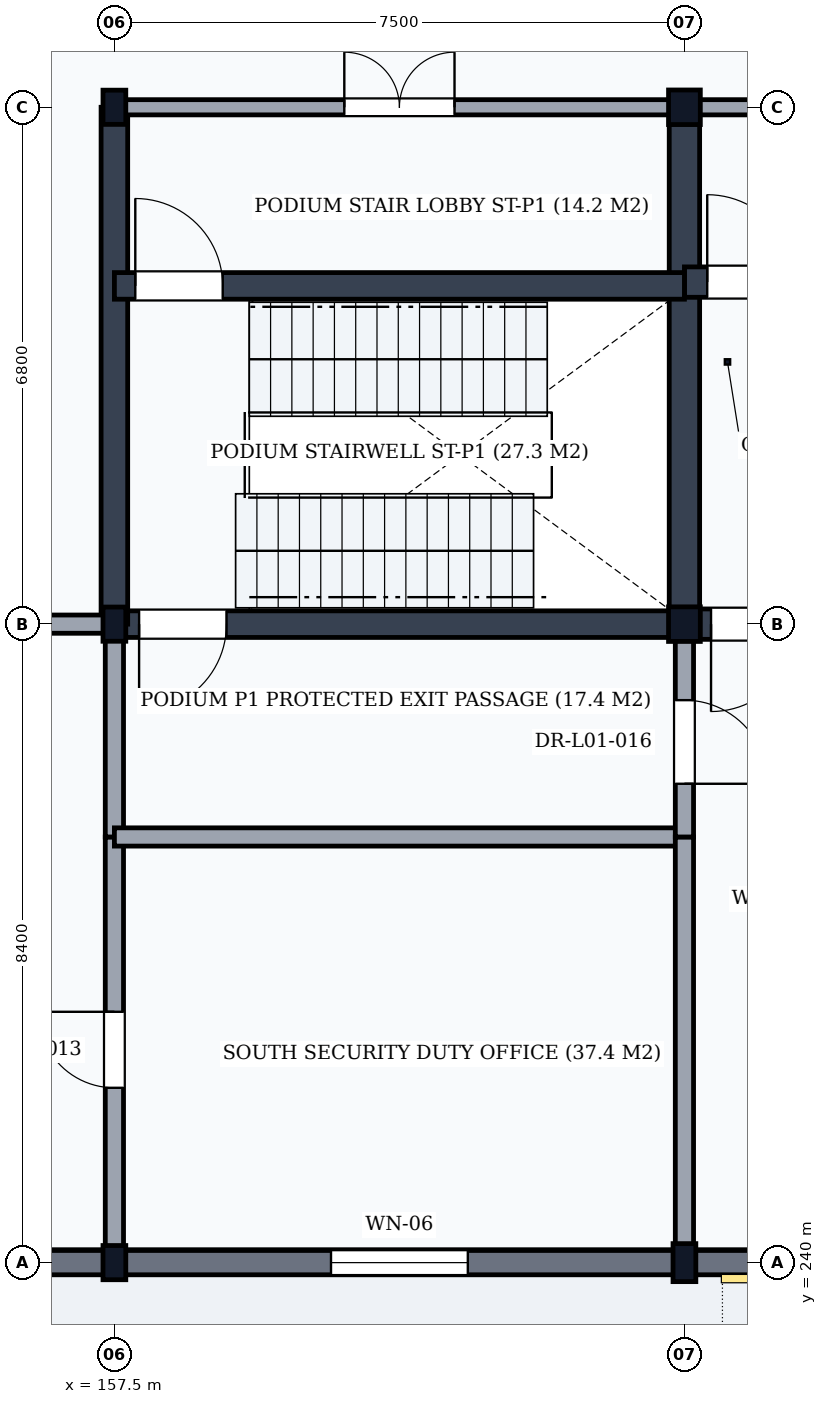
"""IFC4 building model, lengths in metres.
Left out: names, types, materials, properties, quantities, classifications, styles, units other than length and angle.
Written with IfcOpenShell. Run it as: python <this file> out.ifc"""

import sys

from ifc_helpers import new_model, si_unit, direction, frame, frame_2d, origin, origin_2d, place, context, subcontext, project, spatial, rectangle, i_section, extrude, element, fill, save


model = new_model("IFC4")
c1 = context("Model", 3, precision=1e-05, world=origin(), true_north=direction((0.0, 1.0)))
c2 = subcontext(c1, "Body", "Model", "MODEL_VIEW")
j1 = project(units=[si_unit("LENGTHUNIT", "METRE"), si_unit("PLANEANGLEUNIT", "RADIAN")], contexts=[c1])
p1 = place(None, origin())
s1 = spatial("IfcSite", under=j1, at=p1, CompositionType="ELEMENT")
p2 = place(p1, origin())
s2 = spatial("IfcBuilding", under=s1, at=p2, CompositionType="ELEMENT")
p3 = place(p2, origin())
s3 = spatial("IfcBuildingStorey", under=s2, at=p3, CompositionType="ELEMENT", Elevation=0.0)
for number, where, z_axis, x_axis in (
    (1, (157.5, 240.0, 0.0), (0.0, 0.0, 1.0), (1.0, 0.0, 0.0)),
    (2, (157.5, 248.4, 0.0), (0.0, 0.0, 1.0), (1.0, 0.0, 0.0)),
    (3, (157.5, 255.2, 0.0), (0.0, 0.0, 1.0), (1.0, 0.0, 0.0)),
):
    element("IfcColumn", number, at=place(p3, frame(where, z_axis=z_axis, x_axis=x_axis)), inside=s3, PredefinedType="COLUMN", context=c2, shape_type="SweptSolid", body=[
        extrude(i_section(OverallWidth=0.3, OverallDepth=0.45, WebThickness=0.014, FlangeThickness=0.026, FilletRadius=0.027, at=origin_2d()), origin(), (0.0, 0.0, 1.0), 5.4),
    ])
p4 = place(p3, frame((165.0, 240.0, 0.0), z_axis=(0.0, 0.0, 1.0), x_axis=(1.0, 0.0, 0.0)))
e4 = element("IfcColumn", 4, at=p4, inside=s3, PredefinedType="COLUMN", context=c2, shape_type="SweptSolid", body=[
    extrude(i_section(OverallWidth=0.3, OverallDepth=0.5, WebThickness=0.014, FlangeThickness=0.028, FilletRadius=0.027, at=origin_2d()), origin(), (0.0, 0.0, 1.0), 5.4),
])
for number, where, z_axis, x_axis in (
    (5, (165.0, 248.4, 0.0), (0.0, 0.0, 1.0), (1.0, 0.0, 0.0)),
    (6, (165.0, 255.2, 0.0), (0.0, 0.0, 1.0), (1.0, 0.0, 0.0)),
):
    element("IfcColumn", number, at=place(p3, frame(where, z_axis=z_axis, x_axis=x_axis)), inside=s3, PredefinedType="COLUMN", context=c2, shape_type="SweptSolid", body=[
        extrude(i_section(OverallWidth=0.418, OverallDepth=0.455, WebThickness=0.042, FlangeThickness=0.068, FilletRadius=0.015, at=origin_2d()), origin(), (0.0, 0.0, 1.0), 5.4),
    ])
p5 = place(p3, frame((150.006, 240.0, 0.0), z_axis=(0.0, 0.0, 1.0), x_axis=(1.0, 0.0, 0.0)))
e7 = element("IfcWall", 7, at=p5, inside=s3, PredefinedType="SOLIDWALL", context=c2, shape_type="SweptSolid", body=[
    extrude(rectangle(XDim=7.488, YDim=0.32, at=frame_2d((3.744, 0.0))), origin(), (0.0, 0.0, 1.0), 4.878),
])
p6 = place(p5, frame((3.169, 0.0, 0.0)))
e8 = element("IfcOpeningElement", 8, at=p6, cuts=e7, PredefinedType="OPENING", context=c2, shape_type="SweptSolid", body=[
    extrude(rectangle(XDim=1.15, YDim=2.25, at=frame_2d((0.575, 1.125))), frame((0.0, 0.175, 0.0), z_axis=(0.0, -1.0, 0.0), x_axis=(1.0, 0.0, 0.0)), (0.0, 0.0, 1.0), 0.35),
])
p7 = place(p3, frame((157.506, 240.0, 0.0), z_axis=(0.0, 0.0, 1.0), x_axis=(1.0, 0.0, 0.0)))
e9 = element("IfcWall", 9, at=p7, inside=s3, PredefinedType="SOLIDWALL", context=c2, shape_type="SweptSolid", body=[
    extrude(rectangle(XDim=7.488, YDim=0.32, at=frame_2d((3.744, 0.0))), origin(), (0.0, 0.0, 1.0), 4.878),
])
p8 = place(p7, frame((2.844, 0.0, 0.95)))
e10 = element("IfcOpeningElement", 10, at=p8, cuts=e9, PredefinedType="OPENING", context=c2, shape_type="SweptSolid", body=[
    extrude(rectangle(XDim=1.8, YDim=2.6, at=frame_2d((0.9, 1.3))), frame((0.0, 0.175, 0.0), z_axis=(0.0, -1.0, 0.0), x_axis=(1.0, 0.0, 0.0)), (0.0, 0.0, 1.0), 0.35),
])
p9 = place(p3, frame((165.006, 240.0, 0.0), z_axis=(0.0, 0.0, 1.0), x_axis=(1.0, 0.0, 0.0)))
e11 = element("IfcWall", 11, at=p9, inside=s3, PredefinedType="SOLIDWALL", context=c2, shape_type="SweptSolid", body=[
    extrude(rectangle(XDim=7.988, YDim=0.32, at=frame_2d((3.994, 0.0))), origin(), (0.0, 0.0, 1.0), 4.838),
])
p10 = place(p9, frame((2.944, 0.0, 0.0)))
e12 = element("IfcOpeningElement", 12, at=p10, cuts=e11, PredefinedType="OPENING", context=c2, shape_type="SweptSolid", body=[
    extrude(rectangle(XDim=2.1, YDim=2.7, at=frame_2d((1.05, 1.35))), frame((0.0, 0.175, 0.0), z_axis=(0.0, -1.0, 0.0), x_axis=(1.0, 0.0, 0.0)), (0.0, 0.0, 1.0), 0.35),
])
p11 = place(p3, frame((120.1, 240.1, 5.4), z_axis=(0.0, 0.0, 1.0), x_axis=(1.0, 0.0, 0.0)))
e13 = element("IfcWall", 13, at=p11, inside=s3, PredefinedType="PARAPET", context=c2, shape_type="SweptSolid", body=[
    extrude(rectangle(XDim=167.8, YDim=0.18, at=frame_2d((83.9, 0.0))), origin(), (0.0, 0.0, 1.0), 1.2),
])
p12 = place(p3, frame((165.0, 248.4, 0.0), z_axis=(0.0, 0.0, 1.0), x_axis=(1.0, 0.0, 0.0)))
e14 = element("IfcWall", 14, at=p12, inside=s3, PredefinedType="SHEAR", context=c2, shape_type="SweptSolid", body=[
    extrude(rectangle(XDim=8.0, YDim=0.4, at=frame_2d((4.0, 0.0))), origin(), (0.0, 0.0, 1.0), 5.14),
])
p13 = place(p12, frame((0.35, 0.0, 0.0)))
e15 = element("IfcOpeningElement", 15, at=p13, cuts=e14, PredefinedType="OPENING", context=c2, shape_type="SweptSolid", body=[
    extrude(rectangle(XDim=1.15, YDim=2.15, at=frame_2d((0.575, 1.075))), frame((0.0, 0.215, 0.0), z_axis=(0.0, -1.0, 0.0), x_axis=(1.0, 0.0, 0.0)), (0.0, 0.0, 1.0), 0.43),
])
p14 = place(p3, frame((165.0, 248.4, 0.0), z_axis=(0.0, 0.0, 1.0), x_axis=(0.0, 1.0, 0.0)))
e16 = element("IfcWall", 16, at=p14, inside=s3, PredefinedType="SHEAR", context=c2, shape_type="SweptSolid", body=[
    extrude(rectangle(XDim=6.8, YDim=0.4, at=frame_2d((3.4, 0.0))), origin(), (0.0, 0.0, 1.0), 5.14),
])
p15 = place(p3, frame((165.0, 252.9, 0.0), z_axis=(0.0, 0.0, 1.0), x_axis=(1.0, 0.0, 0.0)))
e17 = element("IfcWall", 17, at=p15, inside=s3, PredefinedType="SHEAR", context=c2, shape_type="SweptSolid", body=[
    extrude(rectangle(XDim=8.0, YDim=0.4, at=frame_2d((4.0, 0.0))), origin(), (0.0, 0.0, 1.0), 5.14),
])
p16 = place(p15, frame((0.3, 0.0, 0.0)))
e18 = element("IfcOpeningElement", 18, at=p16, cuts=e17, PredefinedType="OPENING", context=c2, shape_type="SweptSolid", body=[
    extrude(rectangle(XDim=1.15, YDim=2.15, at=frame_2d((0.575, 1.075))), frame((0.0, 0.215, 0.0), z_axis=(0.0, -1.0, 0.0), x_axis=(1.0, 0.0, 0.0)), (0.0, 0.0, 1.0), 0.43),
])
p17 = place(p3, frame((165.0, 255.2, 0.0), z_axis=(0.0, 0.0, 1.0), x_axis=(1.0, 0.0, 0.0)))
e19 = element("IfcWall", 19, at=p17, inside=s3, PredefinedType="PARTITIONING", context=c2, shape_type="SweptSolid", body=[
    extrude(rectangle(XDim=8.0, YDim=0.2, at=frame_2d((4.0, 0.0))), origin(), (0.0, 0.0, 1.0), 4.638),
])
p18 = place(p17, frame((3.275, 0.0, 0.0)))
e20 = element("IfcOpeningElement", 20, at=p18, cuts=e19, PredefinedType="OPENING", context=c2, shape_type="SweptSolid", body=[
    extrude(rectangle(XDim=1.45, YDim=2.2, at=frame_2d((0.725, 1.1))), frame((0.0, 0.115, 0.0), z_axis=(0.0, -1.0, 0.0), x_axis=(1.0, 0.0, 0.0)), (0.0, 0.0, 1.0), 0.23),
])
p19 = place(p3, frame((157.5, 248.4, 0.0), z_axis=(0.0, 0.0, 1.0), x_axis=(1.0, 0.0, 0.0)))
e21 = element("IfcWall", 21, at=p19, inside=s3, PredefinedType="SHEAR", context=c2, shape_type="SweptSolid", body=[
    extrude(rectangle(XDim=7.5, YDim=0.35, at=frame_2d((3.75, 0.0))), origin(), (0.0, 0.0, 1.0), 5.14),
])
p20 = place(p19, frame((0.325, 0.0, 0.0)))
e22 = element("IfcOpeningElement", 22, at=p20, cuts=e21, PredefinedType="OPENING", context=c2, shape_type="SweptSolid", body=[
    extrude(rectangle(XDim=1.15, YDim=2.15, at=frame_2d((0.575, 1.075))), frame((0.0, 0.19, 0.0), z_axis=(0.0, -1.0, 0.0), x_axis=(1.0, 0.0, 0.0)), (0.0, 0.0, 1.0), 0.38),
])
p21 = place(p3, frame((157.5, 248.4, 0.0), z_axis=(0.0, 0.0, 1.0), x_axis=(0.0, 1.0, 0.0)))
e23 = element("IfcWall", 23, at=p21, inside=s3, PredefinedType="SHEAR", context=c2, shape_type="SweptSolid", body=[
    extrude(rectangle(XDim=6.8, YDim=0.35, at=frame_2d((3.4, 0.0))), origin(), (0.0, 0.0, 1.0), 5.14),
])
p22 = place(p3, frame((157.5, 252.85, 0.0), z_axis=(0.0, 0.0, 1.0), x_axis=(1.0, 0.0, 0.0)))
e24 = element("IfcWall", 24, at=p22, inside=s3, PredefinedType="SHEAR", context=c2, shape_type="SweptSolid", body=[
    extrude(rectangle(XDim=7.5, YDim=0.35, at=frame_2d((3.75, 0.0))), origin(), (0.0, 0.0, 1.0), 5.14),
])
p23 = place(p22, frame((0.275, 0.0, 0.0)))
e25 = element("IfcOpeningElement", 25, at=p23, cuts=e24, PredefinedType="OPENING", context=c2, shape_type="SweptSolid", body=[
    extrude(rectangle(XDim=1.15, YDim=2.15, at=frame_2d((0.575, 1.075))), frame((0.0, 0.19, 0.0), z_axis=(0.0, -1.0, 0.0), x_axis=(1.0, 0.0, 0.0)), (0.0, 0.0, 1.0), 0.38),
])
p24 = place(p3, frame((157.5, 255.2, 0.0), z_axis=(0.0, 0.0, 1.0), x_axis=(1.0, 0.0, 0.0)))
e26 = element("IfcWall", 26, at=p24, inside=s3, PredefinedType="PARTITIONING", context=c2, shape_type="SweptSolid", body=[
    extrude(rectangle(XDim=7.5, YDim=0.2, at=frame_2d((3.75, 0.0))), origin(), (0.0, 0.0, 1.0), 4.778),
])
p25 = place(p24, frame((3.025, 0.0, 0.0)))
e27 = element("IfcOpeningElement", 27, at=p25, cuts=e26, PredefinedType="OPENING", context=c2, shape_type="SweptSolid", body=[
    extrude(rectangle(XDim=1.45, YDim=2.2, at=frame_2d((0.725, 1.1))), frame((0.0, 0.115, 0.0), z_axis=(0.0, -1.0, 0.0), x_axis=(1.0, 0.0, 0.0)), (0.0, 0.0, 1.0), 0.23),
])
p26 = place(p3, frame((157.5, 240.0, 0.0), z_axis=(0.0, 0.0, 1.0), x_axis=(0.0, 1.0, 0.0)))
e28 = element("IfcWall", 28, at=p26, inside=s3, PredefinedType="PARTITIONING", context=c2, shape_type="SweptSolid", body=[
    extrude(rectangle(XDim=5.6, YDim=0.24, at=frame_2d((2.8, 0.0))), origin(), (0.0, 0.0, 1.0), 4.688),
])
p27 = place(p26, frame((2.3, 0.0, 0.0)))
e29 = element("IfcOpeningElement", 29, at=p27, cuts=e28, PredefinedType="OPENING", context=c2, shape_type="SweptSolid", body=[
    extrude(rectangle(XDim=1.0, YDim=2.1, at=frame_2d((0.5, 1.05))), frame((0.0, 0.135, 0.0), z_axis=(0.0, -1.0, 0.0), x_axis=(1.0, 0.0, 0.0)), (0.0, 0.0, 1.0), 0.27),
])
p28 = place(p3, frame((157.5, 245.6, 0.0), z_axis=(0.0, 0.0, 1.0), x_axis=(0.0, 1.0, 0.0)))
e30 = element("IfcWall", 30, at=p28, inside=s3, PredefinedType="PARTITIONING", context=c2, shape_type="SweptSolid", body=[
    extrude(rectangle(XDim=2.8, YDim=0.24, at=frame_2d((1.4, 0.0))), origin(), (0.0, 0.0, 1.0), 4.688),
])
p29 = place(p3, frame((150.0, 248.4, 0.0), z_axis=(0.0, 0.0, 1.0), x_axis=(1.0, 0.0, 0.0)))
e31 = element("IfcWall", 31, at=p29, inside=s3, PredefinedType="PARTITIONING", context=c2, shape_type="SweptSolid", body=[
    extrude(rectangle(XDim=7.5, YDim=0.24, at=frame_2d((3.75, 0.0))), origin(), (0.0, 0.0, 1.0), 4.778),
])
p30 = place(p29, frame((3.25, 0.0, 0.0)))
e32 = element("IfcOpeningElement", 32, at=p30, cuts=e31, PredefinedType="OPENING", context=c2, shape_type="SweptSolid", body=[
    extrude(rectangle(XDim=1.0, YDim=2.1, at=frame_2d((0.5, 1.05))), frame((0.0, 0.135, 0.0), z_axis=(0.0, -1.0, 0.0), x_axis=(1.0, 0.0, 0.0)), (0.0, 0.0, 1.0), 0.27),
])
p31 = place(p3, frame((157.5, 245.6, 0.0), z_axis=(0.0, 0.0, 1.0), x_axis=(1.0, 0.0, 0.0)))
e33 = element("IfcWall", 33, at=p31, inside=s3, PredefinedType="PARTITIONING", context=c2, shape_type="SweptSolid", body=[
    extrude(rectangle(XDim=7.5, YDim=0.24, at=frame_2d((3.75, 0.0))), origin(), (0.0, 0.0, 1.0), 5.15),
])
p32 = place(p3, frame((165.0, 240.0, 0.0), z_axis=(0.0, 0.0, 1.0), x_axis=(0.0, 1.0, 0.0)))
e34 = element("IfcWall", 34, at=p32, inside=s3, PredefinedType="PARTITIONING", context=c2, shape_type="SweptSolid", body=[
    extrude(rectangle(XDim=5.6, YDim=0.24, at=frame_2d((2.8, 0.0))), origin(), (0.0, 0.0, 1.0), 4.688),
])
p33 = place(p3, frame((165.0, 245.6, 0.0), z_axis=(0.0, 0.0, 1.0), x_axis=(0.0, 1.0, 0.0)))
e35 = element("IfcWall", 35, at=p33, inside=s3, PredefinedType="PARTITIONING", context=c2, shape_type="SweptSolid", body=[
    extrude(rectangle(XDim=2.8, YDim=0.24, at=frame_2d((1.4, 0.0))), origin(), (0.0, 0.0, 1.0), 4.688),
])
p34 = place(p33, frame((0.7, 0.0, 0.0)))
e36 = element("IfcOpeningElement", 36, at=p34, cuts=e35, PredefinedType="OPENING", context=c2, shape_type="SweptSolid", body=[
    extrude(rectangle(XDim=1.1, YDim=2.1, at=frame_2d((0.55, 1.05))), frame((0.0, 0.135, 0.0), z_axis=(0.0, -1.0, 0.0), x_axis=(1.0, 0.0, 0.0)), (0.0, 0.0, 1.0), 0.27),
])
p35 = place(p8, origin())
e37 = element("IfcWindow", 37, at=p35, inside=s3, PartitioningType="DOUBLE_PANEL_VERTICAL", PredefinedType="WINDOW", context=c2, shape_type="SweptSolid", body=[
    extrude(rectangle(XDim=1.8, YDim=2.6, at=frame_2d((0.9, 1.3))), frame((0.0, 0.03, 0.0), z_axis=(0.0, -1.0, 0.0), x_axis=(1.0, 0.0, 0.0)), (0.0, 0.0, 1.0), 0.06),
])
fill(e10, e37)
p36 = place(p16, origin())
e38 = element("IfcDoor", 38, at=p36, inside=s3, OperationType="SINGLE_SWING_LEFT", PredefinedType="DOOR", context=c2, shape_type="SweptSolid", body=[
    extrude(rectangle(XDim=1.15, YDim=2.15, at=frame_2d((0.575, 1.075))), frame((0.0, 0.025, 0.0), z_axis=(0.0, -1.0, 0.0), x_axis=(1.0, 0.0, 0.0)), (0.0, 0.0, 1.0), 0.05),
])
fill(e18, e38)
p37 = place(p13, frame((1.15, 0.0, 0.0), z_axis=(0.0, 0.0, 1.0), x_axis=(-1.0, 0.0, 0.0)))
e39 = element("IfcDoor", 39, at=p37, inside=s3, OperationType="SINGLE_SWING_RIGHT", PredefinedType="DOOR", context=c2, shape_type="SweptSolid", body=[
    extrude(rectangle(XDim=1.15, YDim=2.15, at=frame_2d((0.575, 1.075))), frame((0.0, 0.025, 0.0), z_axis=(0.0, -1.0, 0.0), x_axis=(1.0, 0.0, 0.0)), (0.0, 0.0, 1.0), 0.05),
])
fill(e15, e39)
p38 = place(p23, origin())
e40 = element("IfcDoor", 40, at=p38, inside=s3, OperationType="SINGLE_SWING_LEFT", PredefinedType="DOOR", context=c2, shape_type="SweptSolid", body=[
    extrude(rectangle(XDim=1.15, YDim=2.15, at=frame_2d((0.575, 1.075))), frame((0.0, 0.025, 0.0), z_axis=(0.0, -1.0, 0.0), x_axis=(1.0, 0.0, 0.0)), (0.0, 0.0, 1.0), 0.05),
])
fill(e25, e40)
p39 = place(p20, frame((1.15, 0.0, 0.0), z_axis=(0.0, 0.0, 1.0), x_axis=(-1.0, 0.0, 0.0)))
e41 = element("IfcDoor", 41, at=p39, inside=s3, OperationType="SINGLE_SWING_RIGHT", PredefinedType="DOOR", context=c2, shape_type="SweptSolid", body=[
    extrude(rectangle(XDim=1.15, YDim=2.15, at=frame_2d((0.575, 1.075))), frame((0.0, 0.025, 0.0), z_axis=(0.0, -1.0, 0.0), x_axis=(1.0, 0.0, 0.0)), (0.0, 0.0, 1.0), 0.05),
])
fill(e22, e41)
p40 = place(p25, origin())
e42 = element("IfcDoor", 42, at=p40, inside=s3, OperationType="DOUBLE_DOOR_SINGLE_SWING", PredefinedType="DOOR", context=c2, shape_type="SweptSolid", body=[
    extrude(rectangle(XDim=1.45, YDim=2.2, at=frame_2d((0.725, 1.1))), frame((0.0, 0.025, 0.0), z_axis=(0.0, -1.0, 0.0), x_axis=(1.0, 0.0, 0.0)), (0.0, 0.0, 1.0), 0.05),
])
fill(e27, e42)
p41 = place(p27, frame((1.0, 0.0, 0.0), z_axis=(0.0, 0.0, 1.0), x_axis=(-1.0, 0.0, 0.0)))
e43 = element("IfcDoor", 43, at=p41, inside=s3, OperationType="SINGLE_SWING_LEFT", PredefinedType="DOOR", context=c2, shape_type="SweptSolid", body=[
    extrude(rectangle(XDim=1.0, YDim=2.1, at=frame_2d((0.5, 1.05))), frame((0.0, 0.025, 0.0), z_axis=(0.0, -1.0, 0.0), x_axis=(1.0, 0.0, 0.0)), (0.0, 0.0, 1.0), 0.05),
])
fill(e29, e43)
p42 = place(p34, frame((1.1, 0.0, 0.0), z_axis=(0.0, 0.0, 1.0), x_axis=(-1.0, 0.0, 0.0)))
e44 = element("IfcDoor", 44, at=p42, inside=s3, OperationType="SINGLE_SWING_RIGHT", PredefinedType="DOOR", context=c2, shape_type="SweptSolid", body=[
    extrude(rectangle(XDim=1.1, YDim=2.1, at=frame_2d((0.55, 1.05))), frame((0.0, 0.025, 0.0), z_axis=(0.0, -1.0, 0.0), x_axis=(1.0, 0.0, 0.0)), (0.0, 0.0, 1.0), 0.05),
])
fill(e36, e44)
save(model, sys.argv[1])
